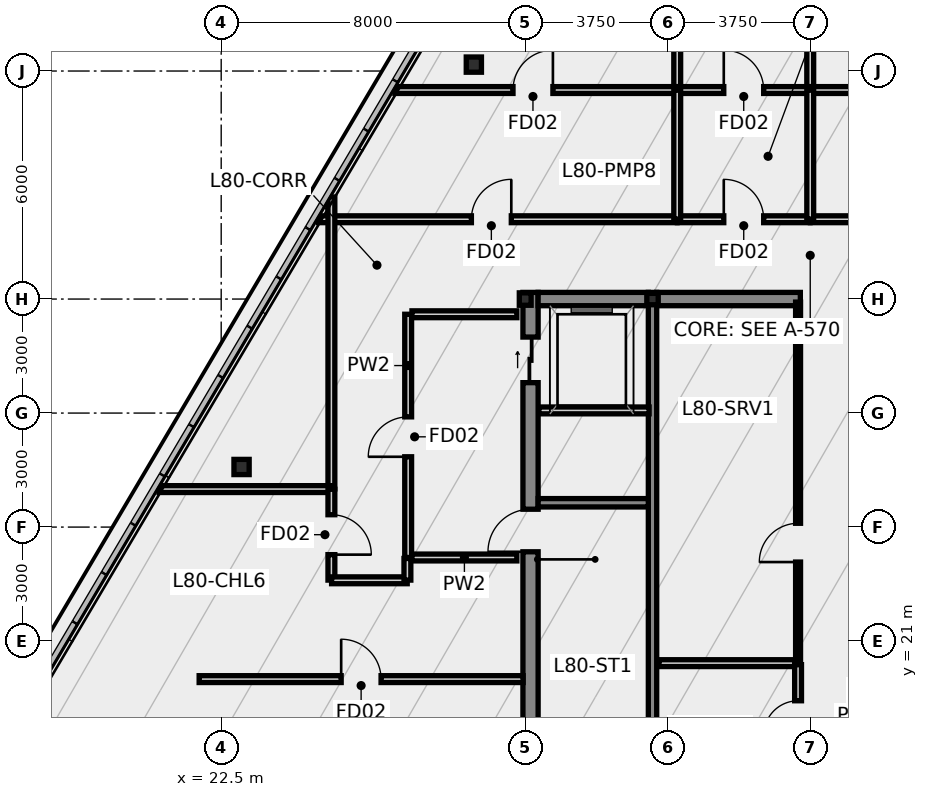
"""IFC4 building model, lengths in metres.
Left out: names, types, materials, properties, quantities, classifications, styles, units other than length and angle.
Written with IfcOpenShell. Run it as: python <this file> out.ifc"""

import sys

from ifc_helpers import new_model, si_unit, direction, frame, frame_2d, origin, origin_2d, place, context, subcontext, project, spatial, rectangle, hollow_rectangle, i_section, extrude, source, transform, mapped, element, fill, save


model = new_model("IFC4")
c1 = context("Model", 3, precision=1e-05, world=origin(), true_north=direction((0.0, 1.0)))
c2 = subcontext(c1, "Body", "Model", "MODEL_VIEW")
j1 = project(units=[si_unit("LENGTHUNIT", "METRE"), si_unit("PLANEANGLEUNIT", "RADIAN")], contexts=[c1])
p1 = place(None, origin())
s1 = spatial("IfcSite", under=j1, at=p1, CompositionType="ELEMENT")
p2 = place(p1, origin())
s2 = spatial("IfcBuilding", under=s1, at=p2, CompositionType="ELEMENT")
p3 = place(p2, frame((0.0, 0.0, 303.4)))
s3 = spatial("IfcBuildingStorey", under=s2, at=p3, CompositionType="ELEMENT", Elevation=303.4)
m1 = source(origin(), c2, "Body", "SweptSolid", [
    extrude(i_section(OverallWidth=0.311, OverallDepth=0.327, WebThickness=0.016, FlangeThickness=0.025, at=origin_2d()), origin(), (0.0, 0.0, 1.0), 9.301),
])
p4 = place(p3, frame((30.5, 30.0, 0.0), z_axis=(0.0, 0.0, 1.0), x_axis=(1.0, 0.0, 0.0)))
e1 = element("IfcColumn", 1, at=p4, inside=s3, PredefinedType="COLUMN", context=c2, shape_type="MappedRepresentation", body=[
    mapped(m1, transform((0.0, 0.0, 0.0), scale=1.0)),
])
m2 = source(origin(), c2, "Body", "SweptSolid", [
    extrude(hollow_rectangle(XDim=0.3, YDim=0.3, WallThickness=0.012, at=origin_2d()), origin(), (0.0, 0.0, 1.0), 9.661),
])
p5 = place(p3, frame((33.85, 30.0, 0.0), z_axis=(0.0, 0.0, 1.0), x_axis=(1.0, 0.0, 0.0)))
e2 = element("IfcColumn", 2, at=p5, inside=s3, PredefinedType="COLUMN", context=c2, shape_type="MappedRepresentation", body=[
    mapped(m2, transform((0.0, 0.0, 0.0), scale=1.0)),
])
p6 = place(p3, frame((30.64, 17.05, 0.0), z_axis=(0.0, 0.0, 1.0), x_axis=(0.0, 1.0, 0.0)))
e3 = element("IfcWall", 3, at=p6, inside=s3, PredefinedType="SHEAR", context=c2, shape_type="SweptSolid", body=[
    extrude(rectangle(XDim=13.125, YDim=0.4, at=frame_2d((6.562, 0.0))), origin(), (0.0, 0.0, 1.0), 6.87),
])
p7 = place(p6, frame((6.3, 0.0, 0.0)))
e4 = element("IfcOpeningElement", 4, at=p7, cuts=e3, PredefinedType="OPENING", context=c2, shape_type="SweptSolid", body=[
    extrude(rectangle(XDim=1.12, YDim=2.15, at=frame_2d((0.56, 1.075))), frame((0.0, 0.212, 0.0), z_axis=(0.0, -1.0, 0.0), x_axis=(1.0, 0.0, 0.0)), (0.0, 0.0, 1.0), 0.424),
])
p8 = place(p6, frame((10.75, 0.0, 0.0)))
e5 = element("IfcOpeningElement", 5, at=p8, cuts=e3, PredefinedType="OPENING", context=c2, shape_type="SweptSolid", body=[
    extrude(rectangle(XDim=1.2, YDim=2.2, at=frame_2d((0.6, 1.1))), frame((0.0, 0.212, 0.0), z_axis=(0.0, -1.0, 0.0), x_axis=(1.0, 0.0, 0.0)), (0.0, 0.0, 1.0), 0.424),
])
p9 = place(p3, frame((30.84, 30.0, 0.0), z_axis=(0.0, 0.0, 1.0), x_axis=(1.0, 0.0, 0.0)))
e6 = element("IfcWall", 6, at=p9, inside=s3, PredefinedType="SHEAR", context=c2, shape_type="SweptSolid", body=[
    extrude(rectangle(XDim=2.9, YDim=0.35, at=frame_2d((1.45, 0.0))), origin(), (0.0, 0.0, 1.0), 6.87),
])
p10 = place(p3, frame((33.96, 30.0, 0.0), z_axis=(0.0, 0.0, 1.0), x_axis=(1.0, 0.0, 0.0)))
e7 = element("IfcWall", 7, at=p10, inside=s3, PredefinedType="SHEAR", context=c2, shape_type="SweptSolid", body=[
    extrude(rectangle(XDim=3.78, YDim=0.35, at=frame_2d((1.89, 0.0))), origin(), (0.0, 0.0, 1.0), 6.87),
])
p11 = place(p3, frame((33.85, 17.05, 0.0), z_axis=(0.0, 0.0, 1.0), x_axis=(0.0, 1.0, 0.0)))
e8 = element("IfcWall", 8, at=p11, inside=s3, PredefinedType="SHEAR", context=c2, shape_type="SweptSolid", body=[
    extrude(rectangle(XDim=13.125, YDim=0.22, at=frame_2d((6.562, 0.0))), origin(), (0.0, 0.0, 1.0), 6.87),
])
p12 = place(p3, frame((30.84, 24.64, 0.0), z_axis=(0.0, 0.0, 1.0), x_axis=(1.0, 0.0, 0.0)))
e9 = element("IfcWall", 9, at=p12, inside=s3, PredefinedType="SHEAR", context=c2, shape_type="SweptSolid", body=[
    extrude(rectangle(XDim=2.9, YDim=0.22, at=frame_2d((1.45, 0.0))), origin(), (0.0, 0.0, 1.0), 6.87),
])
m3 = source(origin(), c2, "Body", "SweptSolid", [
    extrude(hollow_rectangle(XDim=0.4, YDim=0.4, WallThickness=0.016, at=origin_2d()), origin(), (0.0, 0.0, 1.0), 10.304),
])
p13 = place(p3, frame((29.148, 36.169, 0.0), z_axis=(0.0, 0.0, 1.0), x_axis=(1.0, 0.0, 0.0)))
e10 = element("IfcColumn", 10, at=p13, inside=s3, PredefinedType="COLUMN", context=c2, shape_type="MappedRepresentation", body=[
    mapped(m3, transform((0.0, 0.0, 0.0), scale=1.0)),
])
m4 = source(origin(), c2, "Body", "SweptSolid", [
    extrude(hollow_rectangle(XDim=0.4, YDim=0.4, WallThickness=0.016, at=origin_2d()), origin(), (0.0, 0.0, 1.0), 7.676),
])
p14 = place(p3, frame((23.036, 25.581, 0.0), z_axis=(0.0, 0.0, 1.0), x_axis=(1.0, 0.0, 0.0)))
e11 = element("IfcColumn", 11, at=p14, inside=s3, PredefinedType="COLUMN", context=c2, shape_type="MappedRepresentation", body=[
    mapped(m4, transform((0.0, 0.0, 0.0), scale=1.0)),
])
p15 = place(p3, frame((27.42, 23.2, 0.0), z_axis=(0.0, 0.0, 1.0), x_axis=(0.0, 1.0, 0.0)))
e12 = element("IfcWall", 12, at=p15, inside=s3, PredefinedType="PARTITIONING", context=c2, shape_type="SweptSolid", body=[
    extrude(rectangle(XDim=6.4, YDim=0.18, at=frame_2d((3.2, 0.0))), origin(), (0.0, 0.0, 1.0), 3.15),
])
p16 = place(p15, frame((2.65, 0.0, 0.0)))
e13 = element("IfcOpeningElement", 13, at=p16, cuts=e12, PredefinedType="OPENING", context=c2, shape_type="SweptSolid", body=[
    extrude(rectangle(XDim=1.05, YDim=2.15, at=frame_2d((0.525, 1.075))), frame((0.0, 0.102, 0.0), z_axis=(0.0, -1.0, 0.0), x_axis=(1.0, 0.0, 0.0)), (0.0, 0.0, 1.0), 0.204),
])
for number, where, z_axis, x_axis in (
    (14, (27.52, 23.2, 0.0), (0.0, 0.0, 1.0), (1.0, 0.0, 0.0)),
    (15, (27.52, 29.6, 0.0), (0.0, 0.0, 1.0), (1.0, 0.0, 0.0)),
):
    element("IfcWall", number, at=place(p3, frame(where, z_axis=z_axis, x_axis=x_axis)), inside=s3, PredefinedType="PARTITIONING", context=c2, shape_type="SweptSolid", body=[
        extrude(rectangle(XDim=2.76, YDim=0.18, at=frame_2d((1.38, 0.0))), origin(), (0.0, 0.0, 1.0), 3.15),
    ])
p17 = place(p3, frame((30.86, 27.07, 0.0), z_axis=(0.0, 0.0, 1.0), x_axis=(1.0, 0.0, 0.0)))
e16 = element("IfcWall", 16, at=p17, inside=s3, PredefinedType="PARTITIONING", context=c2, shape_type="SweptSolid", body=[
    extrude(rectangle(XDim=2.9, YDim=0.18, at=frame_2d((1.45, 0.0))), origin(), (0.0, 0.0, 1.0), 3.15),
])
p18 = place(p3, frame((34.02, 20.42, 0.0), z_axis=(0.0, 0.0, 1.0), x_axis=(1.0, 0.0, 0.0)))
e17 = element("IfcWall", 17, at=p18, inside=s3, PredefinedType="PARTITIONING", context=c2, shape_type="SweptSolid", body=[
    extrude(rectangle(XDim=3.64, YDim=0.18, at=frame_2d((1.82, 0.0))), origin(), (0.0, 0.0, 1.0), 3.15),
])
p19 = place(p3, frame((37.68, 20.48, 0.0), z_axis=(0.0, 0.0, 1.0), x_axis=(0.0, 1.0, 0.0)))
e18 = element("IfcWall", 18, at=p19, inside=s3, PredefinedType="PARTITIONING", context=c2, shape_type="SweptSolid", body=[
    extrude(rectangle(XDim=9.44, YDim=0.13, at=frame_2d((4.72, 0.0))), origin(), (0.0, 0.0, 1.0), 3.15),
])
p20 = place(p19, frame((2.6, 0.0, 0.0)))
e19 = element("IfcOpeningElement", 19, at=p20, cuts=e18, PredefinedType="OPENING", context=c2, shape_type="SweptSolid", body=[
    extrude(rectangle(XDim=1.02, YDim=2.15, at=frame_2d((0.51, 1.075))), frame((0.0, 0.077, 0.0), z_axis=(0.0, -1.0, 0.0), x_axis=(1.0, 0.0, 0.0)), (0.0, 0.0, 1.0), 0.154),
])
p21 = place(p3, frame((37.68, 17.68, 0.0), z_axis=(0.0, 0.0, 1.0), x_axis=(0.0, 1.0, 0.0)))
e20 = element("IfcWall", 20, at=p21, inside=s3, PredefinedType="PARTITIONING", context=c2, shape_type="SweptSolid", body=[
    extrude(rectangle(XDim=2.7, YDim=0.18, at=frame_2d((1.35, 0.0))), origin(), (0.0, 0.0, 1.0), 3.15),
])
p22 = place(p21, frame((0.85, 0.0, 0.0)))
e21 = element("IfcOpeningElement", 21, at=p22, cuts=e20, PredefinedType="OPENING", context=c2, shape_type="SweptSolid", body=[
    extrude(rectangle(XDim=0.9, YDim=2.1, at=frame_2d((0.45, 1.05))), frame((0.0, 0.102, 0.0), z_axis=(0.0, -1.0, 0.0), x_axis=(1.0, 0.0, 0.0)), (0.0, 0.0, 1.0), 0.204),
])
p23 = place(p3, frame((38.0, 35.505, 0.0), z_axis=(0.0, 0.0, 1.0), x_axis=(0.0, 1.0, 0.0)))
e22 = element("IfcWall", 22, at=p23, inside=s3, PredefinedType="PARTITIONING", context=c2, shape_type="SweptSolid", body=[
    extrude(rectangle(XDim=15.693, YDim=0.18, at=frame_2d((7.847, 0.0))), origin(), (0.0, 0.0, 1.0), 3.15),
])
p24 = place(p3, frame((34.5, 35.505, 0.0), z_axis=(0.0, 0.0, 1.0), x_axis=(0.0, 1.0, 0.0)))
e23 = element("IfcWall", 23, at=p24, inside=s3, PredefinedType="PARTITIONING", context=c2, shape_type="SweptSolid", body=[
    extrude(rectangle(XDim=12.574, YDim=0.18, at=frame_2d((6.287, 0.0))), origin(), (0.0, 0.0, 1.0), 3.15),
])
p25 = place(p3, frame((25.062, 32.1, 0.0), z_axis=(0.0, 0.0, 1.0), x_axis=(1.0, 0.0, 0.0)))
e24 = element("IfcWall", 24, at=p25, inside=s3, PredefinedType="PARTITIONING", context=c2, shape_type="SweptSolid", body=[
    extrude(rectangle(XDim=9.433, YDim=0.18, at=frame_2d((4.717, 0.0))), origin(), (0.0, 0.0, 1.0), 3.15),
])
p26 = place(p25, frame((4.022, 0.0, 0.0)))
e25 = element("IfcOpeningElement", 25, at=p26, cuts=e24, PredefinedType="OPENING", context=c2, shape_type="SweptSolid", body=[
    extrude(rectangle(XDim=1.05, YDim=2.15, at=frame_2d((0.525, 1.075))), frame((0.0, 0.102, 0.0), z_axis=(0.0, -1.0, 0.0), x_axis=(1.0, 0.0, 0.0)), (0.0, 0.0, 1.0), 0.204),
])
p27 = place(p3, frame((21.92, 20.0, 0.0), z_axis=(0.0, 0.0, 1.0), x_axis=(1.0, 0.0, 0.0)))
e26 = element("IfcWall", 26, at=p27, inside=s3, PredefinedType="PARTITIONING", context=c2, shape_type="SweptSolid", body=[
    extrude(rectangle(XDim=8.525, YDim=0.18, at=frame_2d((4.263, 0.0))), origin(), (0.0, 0.0, 1.0), 3.15),
])
p28 = place(p27, frame((3.737, 0.0, 0.0)))
e27 = element("IfcOpeningElement", 27, at=p28, cuts=e26, PredefinedType="OPENING", context=c2, shape_type="SweptSolid", body=[
    extrude(rectangle(XDim=1.05, YDim=2.15, at=frame_2d((0.525, 1.075))), frame((0.0, 0.102, 0.0), z_axis=(0.0, -1.0, 0.0), x_axis=(1.0, 0.0, 0.0)), (0.0, 0.0, 1.0), 0.204),
])
p29 = place(p3, frame((27.072, 35.5, 0.0), z_axis=(0.0, 0.0, 1.0), x_axis=(1.0, 0.0, 0.0)))
e28 = element("IfcWall", 28, at=p29, inside=s3, PredefinedType="PARTITIONING", context=c2, shape_type="SweptSolid", body=[
    extrude(rectangle(XDim=7.423, YDim=0.18, at=frame_2d((3.712, 0.0))), origin(), (0.0, 0.0, 1.0), 3.15),
])
p30 = place(p29, frame((3.107, 0.0, 0.0)))
e29 = element("IfcOpeningElement", 29, at=p30, cuts=e28, PredefinedType="OPENING", context=c2, shape_type="SweptSolid", body=[
    extrude(rectangle(XDim=1.05, YDim=2.15, at=frame_2d((0.525, 1.075))), frame((0.0, 0.102, 0.0), z_axis=(0.0, -1.0, 0.0), x_axis=(1.0, 0.0, 0.0)), (0.0, 0.0, 1.0), 0.204),
])
p31 = place(p3, frame((25.4, 25.005, 0.0), z_axis=(0.0, 0.0, 1.0), x_axis=(0.0, 1.0, 0.0)))
e30 = element("IfcWall", 30, at=p31, inside=s3, PredefinedType="PARTITIONING", context=c2, shape_type="SweptSolid", body=[
    extrude(rectangle(XDim=7.681, YDim=0.18, at=frame_2d((3.84, 0.0))), origin(), (0.0, 0.0, 1.0), 3.15),
])
p32 = place(p3, frame((20.865, 25.0, 0.0), z_axis=(0.0, 0.0, 1.0), x_axis=(1.0, 0.0, 0.0)))
e31 = element("IfcWall", 31, at=p32, inside=s3, PredefinedType="PARTITIONING", context=c2, shape_type="SweptSolid", body=[
    extrude(rectangle(XDim=4.53, YDim=0.18, at=frame_2d((2.265, 0.0))), origin(), (0.0, 0.0, 1.0), 3.15),
])
p33 = place(p3, frame((34.505, 32.1, 0.0), z_axis=(0.0, 0.0, 1.0), x_axis=(1.0, 0.0, 0.0)))
e32 = element("IfcWall", 32, at=p33, inside=s3, PredefinedType="PARTITIONING", context=c2, shape_type="SweptSolid", body=[
    extrude(rectangle(XDim=3.49, YDim=0.18, at=frame_2d((1.745, 0.0))), origin(), (0.0, 0.0, 1.0), 3.15),
])
p34 = place(p33, frame((1.22, 0.0, 0.0)))
e33 = element("IfcOpeningElement", 33, at=p34, cuts=e32, PredefinedType="OPENING", context=c2, shape_type="SweptSolid", body=[
    extrude(rectangle(XDim=1.05, YDim=2.15, at=frame_2d((0.525, 1.075))), frame((0.0, 0.102, 0.0), z_axis=(0.0, -1.0, 0.0), x_axis=(1.0, 0.0, 0.0)), (0.0, 0.0, 1.0), 0.204),
])
p35 = place(p3, frame((38.005, 32.1, 0.0), z_axis=(0.0, 0.0, 1.0), x_axis=(1.0, 0.0, 0.0)))
e34 = element("IfcWall", 34, at=p35, inside=s3, PredefinedType="PARTITIONING", context=c2, shape_type="SweptSolid", body=[
    extrude(rectangle(XDim=3.49, YDim=0.18, at=frame_2d((1.745, 0.0))), origin(), (0.0, 0.0, 1.0), 3.15),
])
p36 = place(p35, frame((1.22, 0.0, 0.0)))
e35 = element("IfcOpeningElement", 35, at=p36, cuts=e34, PredefinedType="OPENING", context=c2, shape_type="SweptSolid", body=[
    extrude(rectangle(XDim=1.05, YDim=2.15, at=frame_2d((0.525, 1.075))), frame((0.0, 0.102, 0.0), z_axis=(0.0, -1.0, 0.0), x_axis=(1.0, 0.0, 0.0)), (0.0, 0.0, 1.0), 0.204),
])
p37 = place(p3, frame((34.505, 35.5, 0.0), z_axis=(0.0, 0.0, 1.0), x_axis=(1.0, 0.0, 0.0)))
e36 = element("IfcWall", 36, at=p37, inside=s3, PredefinedType="PARTITIONING", context=c2, shape_type="SweptSolid", body=[
    extrude(rectangle(XDim=3.49, YDim=0.18, at=frame_2d((1.745, 0.0))), origin(), (0.0, 0.0, 1.0), 3.15),
])
p38 = place(p37, frame((1.22, 0.0, 0.0)))
e37 = element("IfcOpeningElement", 37, at=p38, cuts=e36, PredefinedType="OPENING", context=c2, shape_type="SweptSolid", body=[
    extrude(rectangle(XDim=1.05, YDim=2.15, at=frame_2d((0.525, 1.075))), frame((0.0, 0.102, 0.0), z_axis=(0.0, -1.0, 0.0), x_axis=(1.0, 0.0, 0.0)), (0.0, 0.0, 1.0), 0.204),
])
p39 = place(p3, frame((38.005, 35.5, 0.0), z_axis=(0.0, 0.0, 1.0), x_axis=(1.0, 0.0, 0.0)))
e38 = element("IfcWall", 38, at=p39, inside=s3, PredefinedType="PARTITIONING", context=c2, shape_type="SweptSolid", body=[
    extrude(rectangle(XDim=3.49, YDim=0.18, at=frame_2d((1.745, 0.0))), origin(), (0.0, 0.0, 1.0), 3.15),
])
p40 = place(p39, frame((1.22, 0.0, 0.0)))
e39 = element("IfcOpeningElement", 39, at=p40, cuts=e38, PredefinedType="OPENING", context=c2, shape_type="SweptSolid", body=[
    extrude(rectangle(XDim=1.05, YDim=2.15, at=frame_2d((0.525, 1.075))), frame((0.0, 0.102, 0.0), z_axis=(0.0, -1.0, 0.0), x_axis=(1.0, 0.0, 0.0)), (0.0, 0.0, 1.0), 0.204),
])
for number, where, z_axis, x_axis in (
    (40, (34.5, 32.105, 0.0), (0.0, 0.0, 1.0), (0.0, 1.0, 0.0)),
    (41, (38.0, 32.105, 0.0), (0.0, 0.0, 1.0), (0.0, 1.0, 0.0)),
):
    element("IfcWall", number, at=place(p3, frame(where, z_axis=z_axis, x_axis=x_axis)), inside=s3, PredefinedType="PARTITIONING", context=c2, shape_type="SweptSolid", body=[
        extrude(rectangle(XDim=3.39, YDim=0.18, at=frame_2d((1.695, 0.0))), origin(), (0.0, 0.0, 1.0), 3.15),
    ])
p41 = place(p3, frame((25.4, 24.995, 0.0), z_axis=(0.0, 0.0, 1.0), x_axis=(0.0, -1.0, 0.0)))
e42 = element("IfcWall", 42, at=p41, inside=s3, PredefinedType="PARTITIONING", context=c2, shape_type="SweptSolid", body=[
    extrude(rectangle(XDim=2.39, YDim=0.18, at=frame_2d((1.195, 0.0))), origin(), (0.0, 0.0, 1.0), 3.15),
])
p42 = place(p41, frame((0.67, 0.0, 0.0)))
e43 = element("IfcOpeningElement", 43, at=p42, cuts=e42, PredefinedType="OPENING", context=c2, shape_type="SweptSolid", body=[
    extrude(rectangle(XDim=1.05, YDim=2.15, at=frame_2d((0.525, 1.075))), frame((0.0, 0.102, 0.0), z_axis=(0.0, -1.0, 0.0), x_axis=(1.0, 0.0, 0.0)), (0.0, 0.0, 1.0), 0.204),
])
p43 = place(p3, frame((25.405, 22.6, 0.0), z_axis=(0.0, 0.0, 1.0), x_axis=(1.0, 0.0, 0.0)))
e44 = element("IfcWall", 44, at=p43, inside=s3, PredefinedType="PARTITIONING", context=c2, shape_type="SweptSolid", body=[
    extrude(rectangle(XDim=1.99, YDim=0.18, at=frame_2d((0.995, 0.0))), origin(), (0.0, 0.0, 1.0), 3.15),
])
p44 = place(p3, frame((27.4, 22.605, 0.0), z_axis=(0.0, 0.0, 1.0), x_axis=(0.0, 1.0, 0.0)))
e45 = element("IfcWall", 45, at=p44, inside=s3, PredefinedType="PARTITIONING", context=c2, shape_type="SweptSolid", body=[
    extrude(rectangle(XDim=0.57, YDim=0.18, at=frame_2d((0.285, 0.0))), origin(), (0.0, 0.0, 1.0), 3.15),
])
p45 = place(p7, origin())
e46 = element("IfcDoor", 46, at=p45, inside=s3, OperationType="SINGLE_SWING_LEFT", PredefinedType="DOOR", context=c2, shape_type="SweptSolid", body=[
    extrude(rectangle(XDim=1.12, YDim=2.15, at=frame_2d((0.56, 1.075))), frame((0.0, 0.025, 0.0), z_axis=(0.0, -1.0, 0.0), x_axis=(1.0, 0.0, 0.0)), (0.0, 0.0, 1.0), 0.05),
])
fill(e4, e46)
p46 = place(p8, origin())
e47 = element("IfcDoor", 47, at=p46, inside=s3, OperationType="SLIDING_TO_LEFT", PredefinedType="DOOR", context=c2, shape_type="SweptSolid", body=[
    extrude(rectangle(XDim=1.2, YDim=2.2, at=frame_2d((0.6, 1.1))), frame((0.0, 0.025, 0.0), z_axis=(0.0, -1.0, 0.0), x_axis=(1.0, 0.0, 0.0)), (0.0, 0.0, 1.0), 0.05),
])
fill(e5, e47)
p47 = place(p16, origin())
e48 = element("IfcDoor", 48, at=p47, inside=s3, OperationType="SINGLE_SWING_LEFT", PredefinedType="DOOR", context=c2, shape_type="SweptSolid", body=[
    extrude(rectangle(XDim=1.05, YDim=2.15, at=frame_2d((0.525, 1.075))), frame((0.0, 0.025, 0.0), z_axis=(0.0, -1.0, 0.0), x_axis=(1.0, 0.0, 0.0)), (0.0, 0.0, 1.0), 0.05),
])
fill(e13, e48)
p48 = place(p20, origin())
e49 = element("IfcDoor", 49, at=p48, inside=s3, OperationType="SINGLE_SWING_LEFT", PredefinedType="DOOR", context=c2, shape_type="SweptSolid", body=[
    extrude(rectangle(XDim=1.02, YDim=2.15, at=frame_2d((0.51, 1.075))), frame((0.0, 0.025, 0.0), z_axis=(0.0, -1.0, 0.0), x_axis=(1.0, 0.0, 0.0)), (0.0, 0.0, 1.0), 0.05),
])
fill(e19, e49)
p49 = place(p22, origin())
e50 = element("IfcDoor", 50, at=p49, inside=s3, OperationType="SINGLE_SWING_LEFT", PredefinedType="DOOR", context=c2, shape_type="SweptSolid", body=[
    extrude(rectangle(XDim=0.9, YDim=2.1, at=frame_2d((0.45, 1.05))), frame((0.0, 0.025, 0.0), z_axis=(0.0, -1.0, 0.0), x_axis=(1.0, 0.0, 0.0)), (0.0, 0.0, 1.0), 0.05),
])
fill(e21, e50)
p50 = place(p26, origin())
e51 = element("IfcDoor", 51, at=p50, inside=s3, OperationType="SINGLE_SWING_RIGHT", PredefinedType="DOOR", context=c2, shape_type="SweptSolid", body=[
    extrude(rectangle(XDim=1.05, YDim=2.15, at=frame_2d((0.525, 1.075))), frame((0.0, 0.025, 0.0), z_axis=(0.0, -1.0, 0.0), x_axis=(1.0, 0.0, 0.0)), (0.0, 0.0, 1.0), 0.05),
])
fill(e25, e51)
p51 = place(p28, origin())
e52 = element("IfcDoor", 52, at=p51, inside=s3, OperationType="SINGLE_SWING_LEFT", PredefinedType="DOOR", context=c2, shape_type="SweptSolid", body=[
    extrude(rectangle(XDim=1.05, YDim=2.15, at=frame_2d((0.525, 1.075))), frame((0.0, 0.025, 0.0), z_axis=(0.0, -1.0, 0.0), x_axis=(1.0, 0.0, 0.0)), (0.0, 0.0, 1.0), 0.05),
])
fill(e27, e52)
p52 = place(p30, origin())
e53 = element("IfcDoor", 53, at=p52, inside=s3, OperationType="SINGLE_SWING_RIGHT", PredefinedType="DOOR", context=c2, shape_type="SweptSolid", body=[
    extrude(rectangle(XDim=1.05, YDim=2.15, at=frame_2d((0.525, 1.075))), frame((0.0, 0.025, 0.0), z_axis=(0.0, -1.0, 0.0), x_axis=(1.0, 0.0, 0.0)), (0.0, 0.0, 1.0), 0.05),
])
fill(e29, e53)
p53 = place(p34, origin())
e54 = element("IfcDoor", 54, at=p53, inside=s3, OperationType="SINGLE_SWING_LEFT", PredefinedType="DOOR", context=c2, shape_type="SweptSolid", body=[
    extrude(rectangle(XDim=1.05, YDim=2.15, at=frame_2d((0.525, 1.075))), frame((0.0, 0.025, 0.0), z_axis=(0.0, -1.0, 0.0), x_axis=(1.0, 0.0, 0.0)), (0.0, 0.0, 1.0), 0.05),
])
fill(e33, e54)
p54 = place(p38, origin())
e55 = element("IfcDoor", 55, at=p54, inside=s3, OperationType="SINGLE_SWING_LEFT", PredefinedType="DOOR", context=c2, shape_type="SweptSolid", body=[
    extrude(rectangle(XDim=1.05, YDim=2.15, at=frame_2d((0.525, 1.075))), frame((0.0, 0.025, 0.0), z_axis=(0.0, -1.0, 0.0), x_axis=(1.0, 0.0, 0.0)), (0.0, 0.0, 1.0), 0.05),
])
fill(e37, e55)
p55 = place(p42, origin())
e56 = element("IfcDoor", 56, at=p55, inside=s3, OperationType="SINGLE_SWING_RIGHT", PredefinedType="DOOR", context=c2, shape_type="SweptSolid", body=[
    extrude(rectangle(XDim=1.05, YDim=2.15, at=frame_2d((0.525, 1.075))), frame((0.0, 0.025, 0.0), z_axis=(0.0, -1.0, 0.0), x_axis=(1.0, 0.0, 0.0)), (0.0, 0.0, 1.0), 0.05),
])
fill(e43, e56)
save(model, sys.argv[1])
